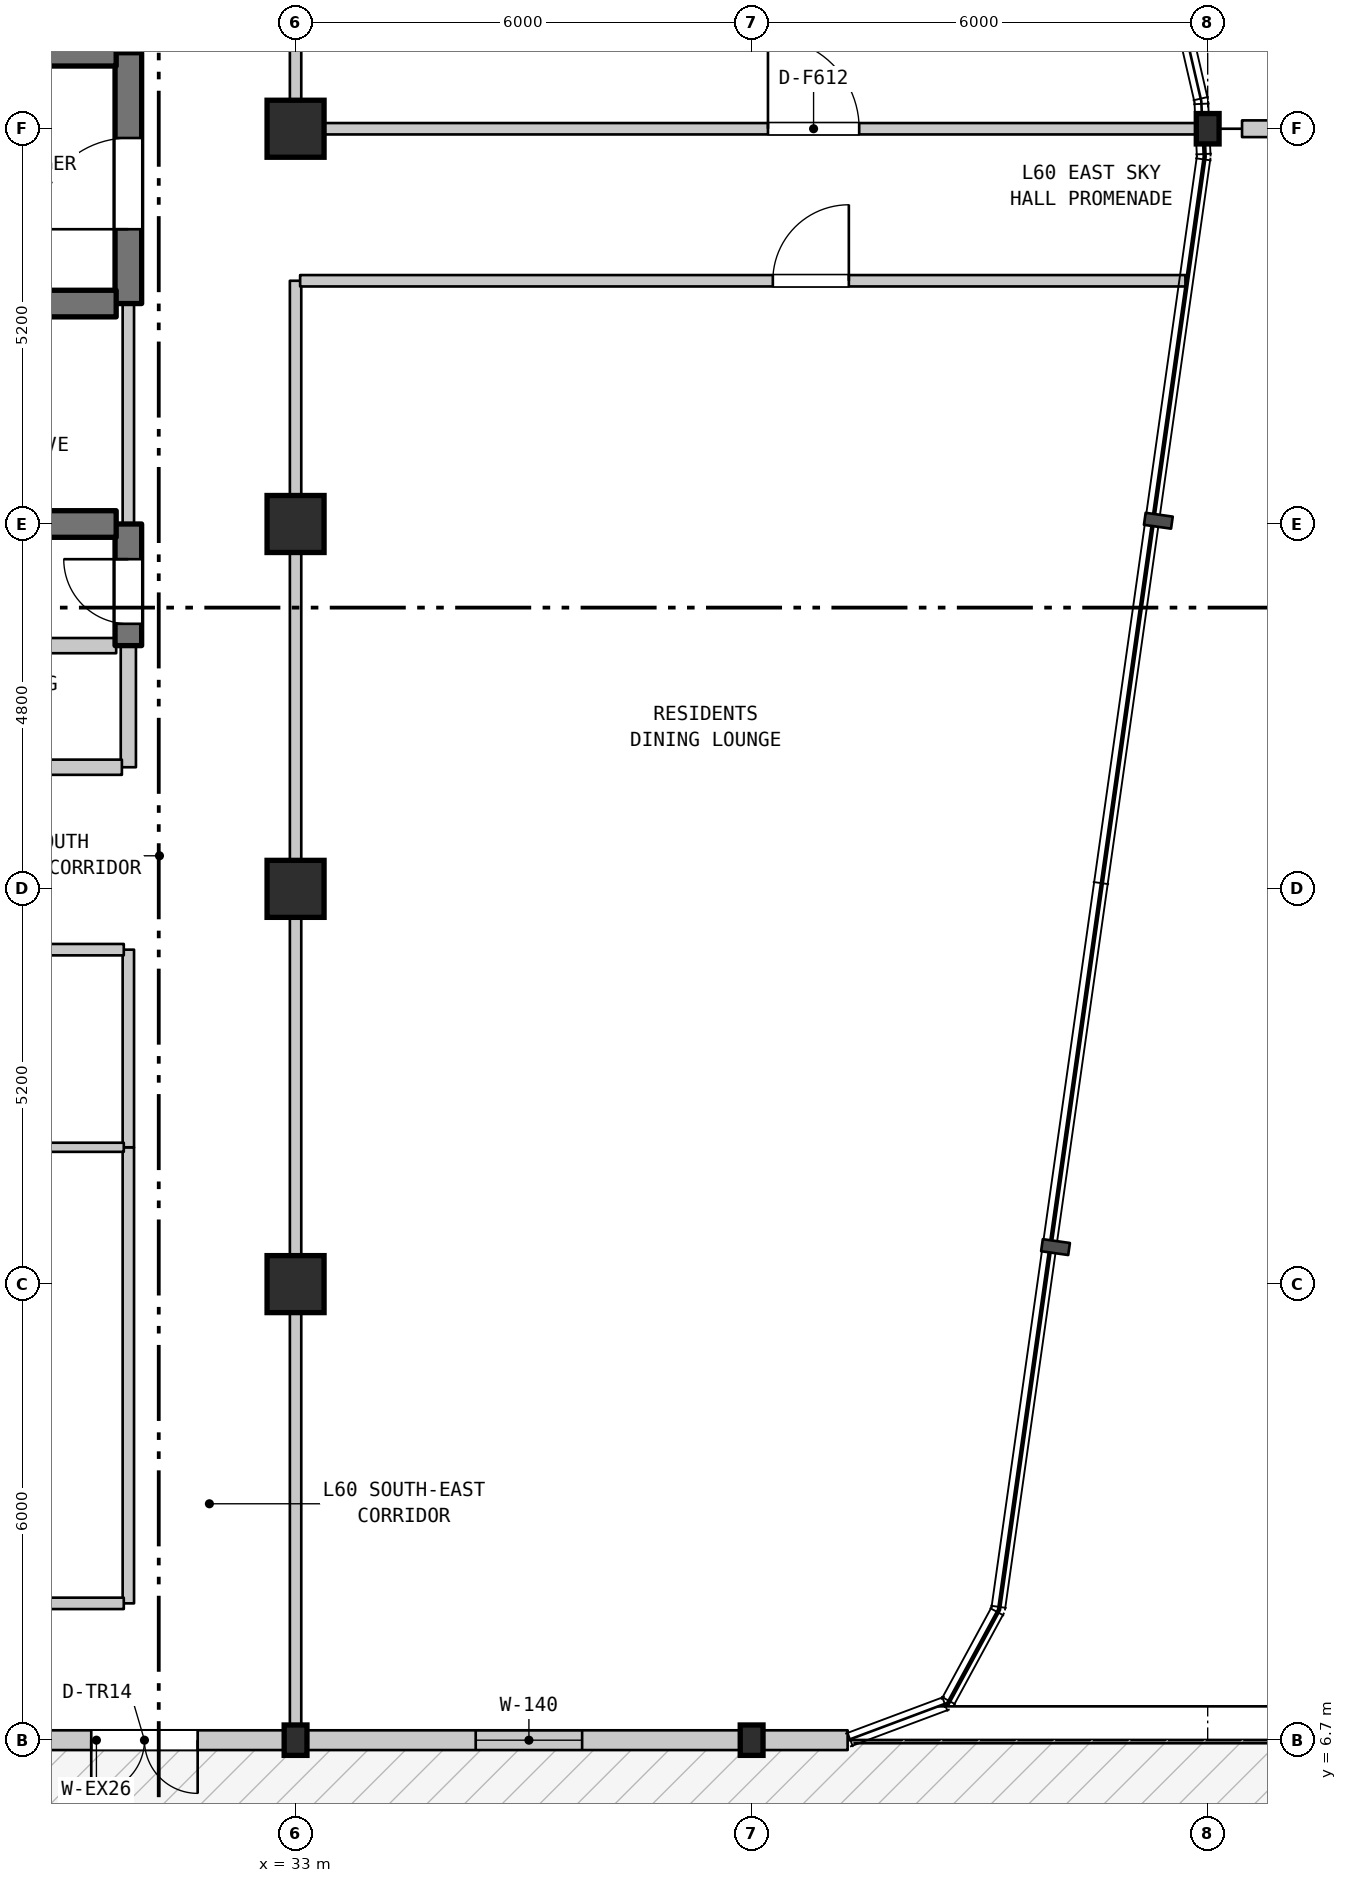
"""IFC4 building model, lengths in metres.
Left out: names, types, materials, properties, quantities, classifications, styles, units other than length and angle.
Written with IfcOpenShell. Run it as: python <this file> out.ifc"""

import sys

from ifc_helpers import new_model, si_unit, direction, frame, frame_2d, origin, origin_2d, place, context, subcontext, project, spatial, rectangle, i_section, extrude, element, fill, save


model = new_model("IFC4")
c1 = context("Model", 3, precision=1e-05, world=origin(), true_north=direction((0.0, 1.0)))
c2 = subcontext(c1, "Body", "Model", "MODEL_VIEW")
j1 = project(units=[si_unit("LENGTHUNIT", "METRE"), si_unit("PLANEANGLEUNIT", "RADIAN")], contexts=[c1])
p1 = place(None, origin())
s1 = spatial("IfcSite", under=j1, at=p1, CompositionType="ELEMENT")
p2 = place(p1, origin())
s2 = spatial("IfcBuilding", under=s1, at=p2, CompositionType="ELEMENT")
p3 = place(p2, frame((0.0, 0.0, 242.8)))
s3 = spatial("IfcBuildingStorey", under=s2, at=p3, CompositionType="ELEMENT", Elevation=242.8)
p4 = place(p3, frame((33.0, 6.7, 0.0), z_axis=(0.0, 0.0, 1.0), x_axis=(1.0, 0.0, 0.0)))
e1 = element("IfcColumn", 1, at=p4, inside=s3, PredefinedType="COLUMN", context=c2, shape_type="SweptSolid", body=[
    extrude(i_section(OverallWidth=0.3, OverallDepth=0.4, WebThickness=0.013, FlangeThickness=0.024, FilletRadius=0.027, at=origin_2d()), origin(), (0.0, 0.0, 1.0), 4.5),
])
for number, where, z_axis, x_axis in (
    (2, (33.0, 12.7, 0.0), (0.0, 0.0, 1.0), (1.0, 0.0, 0.0)),
    (3, (33.0, 17.9, 0.0), (0.0, 0.0, 1.0), (1.0, 0.0, 0.0)),
    (4, (33.0, 22.7, 0.0), (0.0, 0.0, 1.0), (1.0, 0.0, 0.0)),
    (5, (33.0, 27.9, 0.0), (0.0, 0.0, 1.0), (1.0, 0.0, 0.0)),
):
    element("IfcColumn", number, at=place(p3, frame(where, z_axis=z_axis, x_axis=x_axis)), inside=s3, PredefinedType="COLUMN", context=c2, shape_type="SweptSolid", body=[
        extrude(rectangle(XDim=0.75, YDim=0.75, at=origin_2d()), origin(), (0.0, 0.0, 1.0), 4.5),
    ])
for number, where, z_axis, x_axis in (
    (6, (39.0, 6.7, 0.0), (0.0, 0.0, 1.0), (1.0, 0.0, 0.0)),
    (7, (45.0, 27.9, 0.0), (0.0, 0.0, 1.0), (1.0, 0.0, 0.0)),
):
    element("IfcColumn", number, at=place(p3, frame(where, z_axis=z_axis, x_axis=x_axis)), inside=s3, PredefinedType="COLUMN", context=c2, shape_type="SweptSolid", body=[
        extrude(i_section(OverallWidth=0.3, OverallDepth=0.4, WebThickness=0.013, FlangeThickness=0.024, FilletRadius=0.027, at=origin_2d()), origin(), (0.0, 0.0, 1.0), 4.5),
    ])
p5 = place(p3, frame((40.263, 6.7, 0.0), z_axis=(0.0, 0.0, 1.0), x_axis=(-1.0, 0.0, 0.0)))
e8 = element("IfcWall", 8, at=p5, inside=s3, PredefinedType="STANDARD", context=c2, shape_type="SweptSolid", body=[
    extrude(rectangle(XDim=1.263, YDim=0.26, at=frame_2d((0.631, 0.0))), origin(), (0.0, 0.0, 1.0), 4.19),
])
p6 = place(p3, frame((45.452, 27.9, 0.0), z_axis=(0.0, 0.0, 1.0), x_axis=(1.0, 0.0, 0.0)))
e9 = element("IfcWall", 9, at=p6, inside=s3, PredefinedType="PARAPET", context=c2, shape_type="SweptSolid", body=[
    extrude(rectangle(XDim=9.548, YDim=0.22, at=frame_2d((4.774, 0.0))), origin(), (0.0, 0.0, 1.0), 0.55),
])
p7 = place(p3, frame((30.8, 8.5, 0.0), z_axis=(0.0, 0.0, 1.0), x_axis=(0.0, 1.0, 0.0)))
e10 = element("IfcWall", 10, at=p7, inside=s3, PredefinedType="STANDARD", context=c2, shape_type="SweptSolid", body=[
    extrude(rectangle(XDim=6.0, YDim=0.15, at=frame_2d((3.0, 0.0))), origin(), (0.0, 0.0, 1.0), 4.19),
])
p8 = place(p3, frame((30.8, 14.5, 0.0), z_axis=(0.0, 0.0, 1.0), x_axis=(0.0, 1.0, 0.0)))
e11 = element("IfcWall", 11, at=p8, inside=s3, PredefinedType="STANDARD", context=c2, shape_type="SweptSolid", body=[
    extrude(rectangle(XDim=2.6, YDim=0.15, at=frame_2d((1.3, 0.0))), origin(), (0.0, 0.0, 1.0), 4.19),
])
p9 = place(p3, frame((30.8, 19.5, 0.0), z_axis=(0.0, 0.0, 1.0), x_axis=(0.0, 1.0, 0.0)))
e12 = element("IfcWall", 12, at=p9, inside=s3, PredefinedType="STANDARD", context=c2, shape_type="SweptSolid", body=[
    extrude(rectangle(XDim=1.6, YDim=0.2, at=frame_2d((0.8, 0.0))), origin(), (0.0, 0.0, 1.0), 4.19),
])
p10 = place(p3, frame((30.8, 21.1, 0.0), z_axis=(0.0, 0.0, 1.0), x_axis=(0.0, 1.0, 0.0)))
e13 = element("IfcWall", 13, at=p10, inside=s3, PredefinedType="SHEAR", context=c2, shape_type="SweptSolid", body=[
    extrude(rectangle(XDim=1.6, YDim=0.35, at=frame_2d((0.8, 0.0))), origin(), (0.0, 0.0, 1.0), 4.19),
])
p11 = place(p10, frame((0.287, 0.0, 0.0)))
e14 = element("IfcOpeningElement", 14, at=p11, cuts=e13, PredefinedType="OPENING", context=c2, shape_type="SweptSolid", body=[
    extrude(rectangle(XDim=0.85, YDim=2.1, at=frame_2d((0.425, 1.05))), frame((0.0, 0.185, 0.0), z_axis=(0.0, -1.0, 0.0), x_axis=(1.0, 0.0, 0.0)), (0.0, 0.0, 1.0), 0.37),
])
p12 = place(p3, frame((30.8, 22.7, 0.0), z_axis=(0.0, 0.0, 1.0), x_axis=(0.0, 1.0, 0.0)))
e15 = element("IfcWall", 15, at=p12, inside=s3, PredefinedType="STANDARD", context=c2, shape_type="SweptSolid", body=[
    extrude(rectangle(XDim=2.9, YDim=0.15, at=frame_2d((1.45, 0.0))), origin(), (0.0, 0.0, 1.0), 4.19),
])
p13 = place(p3, frame((30.8, 25.6, 0.0), z_axis=(0.0, 0.0, 1.0), x_axis=(0.0, 1.0, 0.0)))
e16 = element("IfcWall", 16, at=p13, inside=s3, PredefinedType="SHEAR", context=c2, shape_type="SweptSolid", body=[
    extrude(rectangle(XDim=3.3, YDim=0.35, at=frame_2d((1.65, 0.0))), origin(), (0.0, 0.0, 1.0), 4.19),
])
p14 = place(p13, frame((0.978, 0.0, 0.0)))
e17 = element("IfcOpeningElement", 17, at=p14, cuts=e16, PredefinedType="OPENING", context=c2, shape_type="SweptSolid", body=[
    extrude(rectangle(XDim=1.2, YDim=2.2, at=frame_2d((0.6, 1.1))), frame((0.0, 0.185, 0.0), z_axis=(0.0, -1.0, 0.0), x_axis=(1.0, 0.0, 0.0)), (0.0, 0.0, 1.0), 0.37),
])
p15 = place(p3, frame((33.0, 6.71, 0.0), z_axis=(0.0, 0.0, 1.0), x_axis=(0.0, 1.0, 0.0)))
e18 = element("IfcWall", 18, at=p15, inside=s3, PredefinedType="STANDARD", context=c2, shape_type="SweptSolid", body=[
    extrude(rectangle(XDim=19.19, YDim=0.15, at=frame_2d((9.595, 0.0))), origin(), (0.0, 0.0, 1.0), 3.9),
])
p16 = place(p3, frame((33.0, 27.9, 0.0), z_axis=(0.0, 0.0, 1.0), x_axis=(0.0, 1.0, 0.0)))
e19 = element("IfcWall", 19, at=p16, inside=s3, PredefinedType="STANDARD", context=c2, shape_type="SweptSolid", body=[
    extrude(rectangle(XDim=10.0, YDim=0.15, at=frame_2d((5.0, 0.0))), origin(), (0.0, 0.0, 1.0), 3.69),
])
p17 = place(p3, frame((25.245, 8.5, 0.0), z_axis=(0.0, 0.0, 1.0), x_axis=(1.0, 0.0, 0.0)))
e20 = element("IfcWall", 20, at=p17, inside=s3, PredefinedType="STANDARD", context=c2, shape_type="SweptSolid", body=[
    extrude(rectangle(XDim=5.495, YDim=0.15, at=frame_2d((2.748, 0.0))), origin(), (0.0, 0.0, 1.0), 4.19),
])
p18 = place(p17, frame((2.469, 0.0, 0.0)))
e21 = element("IfcOpeningElement", 21, at=p18, cuts=e20, PredefinedType="OPENING", context=c2, shape_type="SweptSolid", body=[
    extrude(rectangle(XDim=1.0, YDim=2.15, at=frame_2d((0.5, 1.075))), frame((0.0, 0.085, 0.0), z_axis=(0.0, -1.0, 0.0), x_axis=(1.0, 0.0, 0.0)), (0.0, 0.0, 1.0), 0.17),
])
p19 = place(p3, frame((27.045, 14.5, 0.0), z_axis=(0.0, 0.0, 1.0), x_axis=(1.0, 0.0, 0.0)))
e22 = element("IfcWall", 22, at=p19, inside=s3, PredefinedType="PARTITIONING", context=c2, shape_type="SweptSolid", body=[
    extrude(rectangle(XDim=3.695, YDim=0.12, at=frame_2d((1.848, 0.0))), origin(), (0.0, 0.0, 1.0), 4.19),
])
p20 = place(p3, frame((27.045, 17.1, 0.0), z_axis=(0.0, 0.0, 1.0), x_axis=(1.0, 0.0, 0.0)))
e23 = element("IfcWall", 23, at=p20, inside=s3, PredefinedType="STANDARD", context=c2, shape_type="SweptSolid", body=[
    extrude(rectangle(XDim=3.695, YDim=0.15, at=frame_2d((1.848, 0.0))), origin(), (0.0, 0.0, 1.0), 4.19),
])
p21 = place(p3, frame((27.285, 19.5, 0.0), z_axis=(0.0, 0.0, 1.0), x_axis=(1.0, 0.0, 0.0)))
e24 = element("IfcWall", 24, at=p21, inside=s3, PredefinedType="STANDARD", context=c2, shape_type="SweptSolid", body=[
    extrude(rectangle(XDim=3.43, YDim=0.2, at=frame_2d((1.715, 0.0))), origin(), (0.0, 0.0, 1.0), 4.19),
])
p22 = place(p21, frame((1.192, 0.0, 0.0)))
e25 = element("IfcOpeningElement", 25, at=p22, cuts=e24, PredefinedType="OPENING", context=c2, shape_type="SweptSolid", body=[
    extrude(rectangle(XDim=0.9, YDim=2.15, at=frame_2d((0.45, 1.075))), frame((0.0, 0.11, 0.0), z_axis=(0.0, -1.0, 0.0), x_axis=(1.0, 0.0, 0.0)), (0.0, 0.0, 1.0), 0.22),
])
p23 = place(p3, frame((27.285, 21.1, 0.0), z_axis=(0.0, 0.0, 1.0), x_axis=(1.0, 0.0, 0.0)))
e26 = element("IfcWall", 26, at=p23, inside=s3, PredefinedType="STANDARD", context=c2, shape_type="SweptSolid", body=[
    extrude(rectangle(XDim=3.355, YDim=0.2, at=frame_2d((1.677, 0.0))), origin(), (0.0, 0.0, 1.0), 4.19),
])
p24 = place(p3, frame((27.46, 22.7, 0.0), z_axis=(0.0, 0.0, 1.0), x_axis=(1.0, 0.0, 0.0)))
e27 = element("IfcWall", 27, at=p24, inside=s3, PredefinedType="SHEAR", context=c2, shape_type="SweptSolid", body=[
    extrude(rectangle(XDim=3.18, YDim=0.35, at=frame_2d((1.59, 0.0))), origin(), (0.0, 0.0, 1.0), 4.19),
])
p25 = place(p3, frame((27.46, 25.6, 0.0), z_axis=(0.0, 0.0, 1.0), x_axis=(1.0, 0.0, 0.0)))
e28 = element("IfcWall", 28, at=p25, inside=s3, PredefinedType="SHEAR", context=c2, shape_type="SweptSolid", body=[
    extrude(rectangle(XDim=3.18, YDim=0.35, at=frame_2d((1.59, 0.0))), origin(), (0.0, 0.0, 1.0), 4.19),
])
p26 = place(p25, frame((1.115, 0.0, 0.0)))
e29 = element("IfcOpeningElement", 29, at=p26, cuts=e28, PredefinedType="OPENING", context=c2, shape_type="SweptSolid", body=[
    extrude(rectangle(XDim=0.95, YDim=2.15, at=frame_2d((0.475, 1.075))), frame((0.0, 0.185, 0.0), z_axis=(0.0, -1.0, 0.0), x_axis=(1.0, 0.0, 0.0)), (0.0, 0.0, 1.0), 0.37),
])
p27 = place(p3, frame((33.06, 25.9, 0.0), z_axis=(0.0, 0.0, 1.0), x_axis=(1.0, 0.0, 0.0)))
e30 = element("IfcWall", 30, at=p27, inside=s3, PredefinedType="STANDARD", context=c2, shape_type="SweptSolid", body=[
    extrude(rectangle(XDim=11.647, YDim=0.15, at=frame_2d((5.823, 0.0))), origin(), (0.0, 0.0, 1.0), 4.19),
])
p28 = place(p27, frame((6.219, 0.0, 0.0)))
e31 = element("IfcOpeningElement", 31, at=p28, cuts=e30, PredefinedType="OPENING", context=c2, shape_type="SweptSolid", body=[
    extrude(rectangle(XDim=1.0, YDim=2.15, at=frame_2d((0.5, 1.075))), frame((0.0, 0.085, 0.0), z_axis=(0.0, -1.0, 0.0), x_axis=(1.0, 0.0, 0.0)), (0.0, 0.0, 1.0), 0.17),
])
p29 = place(p3, frame((33.06, 27.9, 0.0), z_axis=(0.0, 0.0, 1.0), x_axis=(1.0, 0.0, 0.0)))
e32 = element("IfcWall", 32, at=p29, inside=s3, PredefinedType="STANDARD", context=c2, shape_type="SweptSolid", body=[
    extrude(rectangle(XDim=11.862, YDim=0.15, at=frame_2d((5.931, 0.0))), origin(), (0.0, 0.0, 1.0), 3.69),
])
p30 = place(p29, frame((6.155, 0.0, 0.0)))
e33 = element("IfcOpeningElement", 33, at=p30, cuts=e32, PredefinedType="OPENING", context=c2, shape_type="SweptSolid", body=[
    extrude(rectangle(XDim=1.2, YDim=2.2, at=frame_2d((0.6, 1.1))), frame((0.0, 0.085, 0.0), z_axis=(0.0, -1.0, 0.0), x_axis=(1.0, 0.0, 0.0)), (0.0, 0.0, 1.0), 0.17),
])
p31 = place(p3, frame((27.46, 28.9, 0.0), z_axis=(0.0, 0.0, 1.0), x_axis=(1.0, 0.0, 0.0)))
e34 = element("IfcWall", 34, at=p31, inside=s3, PredefinedType="SHEAR", context=c2, shape_type="SweptSolid", body=[
    extrude(rectangle(XDim=3.18, YDim=0.35, at=frame_2d((1.59, 0.0))), origin(), (0.0, 0.0, 1.0), 4.19),
])
p32 = place(p31, frame((1.115, 0.0, 0.0)))
e35 = element("IfcOpeningElement", 35, at=p32, cuts=e34, PredefinedType="OPENING", context=c2, shape_type="SweptSolid", body=[
    extrude(rectangle(XDim=0.95, YDim=2.15, at=frame_2d((0.475, 1.075))), frame((0.0, 0.185, 0.0), z_axis=(0.0, -1.0, 0.0), x_axis=(1.0, 0.0, 0.0)), (0.0, 0.0, 1.0), 0.37),
])
p33 = place(p3, frame((39.0, 6.7, 0.0), z_axis=(0.0, 0.0, 1.0), x_axis=(-1.0, 0.0, 0.0)))
e36 = element("IfcWall", 36, at=p33, inside=s3, PredefinedType="STANDARD", context=c2, shape_type="SweptSolid", body=[
    extrude(rectangle(XDim=17.24, YDim=0.26, at=frame_2d((8.62, 0.0))), origin(), (0.0, 0.0, 1.0), 3.84),
])
p34 = place(p33, frame((7.288, 0.0, 0.0)))
e37 = element("IfcOpeningElement", 37, at=p34, cuts=e36, PredefinedType="OPENING", context=c2, shape_type="SweptSolid", body=[
    extrude(rectangle(XDim=1.4, YDim=2.2, at=frame_2d((0.7, 1.1))), frame((0.0, 0.14, 0.0), z_axis=(0.0, -1.0, 0.0), x_axis=(1.0, 0.0, 0.0)), (0.0, 0.0, 1.0), 0.28),
])
p35 = place(p33, frame((2.23, 0.0, 0.9)))
e38 = element("IfcOpeningElement", 38, at=p35, cuts=e36, PredefinedType="OPENING", context=c2, shape_type="SweptSolid", body=[
    extrude(rectangle(XDim=1.4, YDim=1.85, at=frame_2d((0.7, 0.925))), frame((0.0, 0.14, 0.0), z_axis=(0.0, -1.0, 0.0), x_axis=(1.0, 0.0, 0.0)), (0.0, 0.0, 1.0), 0.28),
])
p36 = place(p33, frame((9.367, 0.0, 0.9)))
e39 = element("IfcOpeningElement", 39, at=p36, cuts=e36, PredefinedType="OPENING", context=c2, shape_type="SweptSolid", body=[
    extrude(rectangle(XDim=1.3, YDim=1.9, at=frame_2d((0.65, 0.95))), frame((0.0, 0.14, 0.0), z_axis=(0.0, -1.0, 0.0), x_axis=(1.0, 0.0, 0.0)), (0.0, 0.0, 1.0), 0.28),
])
p37 = place(p33, frame((13.196, 0.0, 0.9)))
e40 = element("IfcOpeningElement", 40, at=p37, cuts=e36, PredefinedType="OPENING", context=c2, shape_type="SweptSolid", body=[
    extrude(rectangle(XDim=1.4, YDim=1.85, at=frame_2d((0.7, 0.925))), frame((0.0, 0.14, 0.0), z_axis=(0.0, -1.0, 0.0), x_axis=(1.0, 0.0, 0.0)), (0.0, 0.0, 1.0), 0.28),
])
p38 = place(p34, origin())
e41 = element("IfcDoor", 41, at=p38, inside=s3, OperationType="DOUBLE_DOOR_SINGLE_SWING", PredefinedType="DOOR", context=c2, shape_type="SweptSolid", body=[
    extrude(rectangle(XDim=1.4, YDim=2.2, at=frame_2d((0.7, 1.1))), frame((0.0, 0.025, 0.0), z_axis=(0.0, -1.0, 0.0), x_axis=(1.0, 0.0, 0.0)), (0.0, 0.0, 1.0), 0.05),
])
fill(e37, e41)
p39 = place(p35, origin())
e42 = element("IfcWindow", 42, at=p39, inside=s3, PartitioningType="SINGLE_PANEL", PredefinedType="WINDOW", context=c2, shape_type="SweptSolid", body=[
    extrude(rectangle(XDim=1.4, YDim=1.85, at=frame_2d((0.7, 0.925))), frame((0.0, 0.03, 0.0), z_axis=(0.0, -1.0, 0.0), x_axis=(1.0, 0.0, 0.0)), (0.0, 0.0, 1.0), 0.06),
])
fill(e38, e42)
p40 = place(p11, origin())
e43 = element("IfcDoor", 43, at=p40, inside=s3, OperationType="SINGLE_SWING_RIGHT", PredefinedType="DOOR", context=c2, shape_type="SweptSolid", body=[
    extrude(rectangle(XDim=0.85, YDim=2.1, at=frame_2d((0.425, 1.05))), frame((0.0, 0.025, 0.0), z_axis=(0.0, -1.0, 0.0), x_axis=(1.0, 0.0, 0.0)), (0.0, 0.0, 1.0), 0.05),
])
fill(e14, e43)
p41 = place(p14, origin())
e44 = element("IfcDoor", 44, at=p41, inside=s3, OperationType="SINGLE_SWING_LEFT", PredefinedType="DOOR", context=c2, shape_type="SweptSolid", body=[
    extrude(rectangle(XDim=1.2, YDim=2.2, at=frame_2d((0.6, 1.1))), frame((0.0, 0.025, 0.0), z_axis=(0.0, -1.0, 0.0), x_axis=(1.0, 0.0, 0.0)), (0.0, 0.0, 1.0), 0.05),
])
fill(e17, e44)
p42 = place(p28, origin())
e45 = element("IfcDoor", 45, at=p42, inside=s3, OperationType="SINGLE_SWING_RIGHT", PredefinedType="DOOR", context=c2, shape_type="SweptSolid", body=[
    extrude(rectangle(XDim=1.0, YDim=2.15, at=frame_2d((0.5, 1.075))), frame((0.0, 0.025, 0.0), z_axis=(0.0, -1.0, 0.0), x_axis=(1.0, 0.0, 0.0)), (0.0, 0.0, 1.0), 0.05),
])
fill(e31, e45)
p43 = place(p30, origin())
e46 = element("IfcDoor", 46, at=p43, inside=s3, OperationType="SINGLE_SWING_LEFT", PredefinedType="DOOR", context=c2, shape_type="SweptSolid", body=[
    extrude(rectangle(XDim=1.2, YDim=2.2, at=frame_2d((0.6, 1.1))), frame((0.0, 0.025, 0.0), z_axis=(0.0, -1.0, 0.0), x_axis=(1.0, 0.0, 0.0)), (0.0, 0.0, 1.0), 0.05),
])
fill(e33, e46)
save(model, sys.argv[1])
